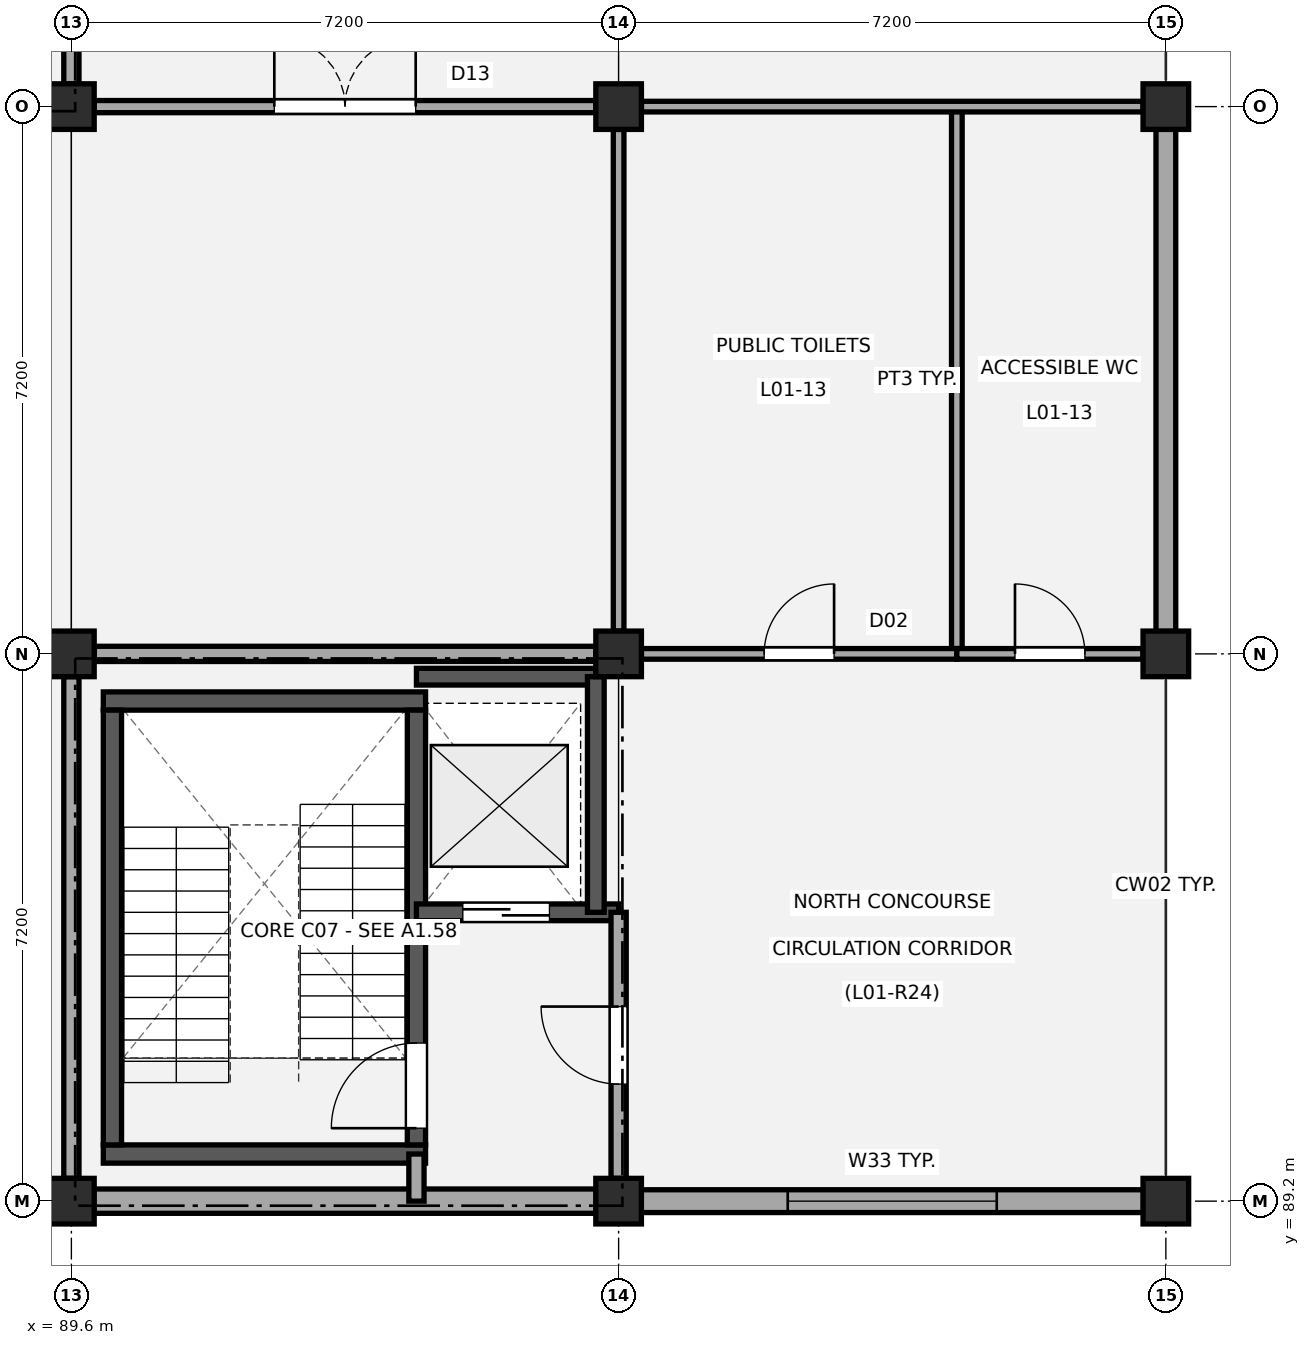
"""IFC4 building model, lengths in metres.
Left out: names, types, materials, properties, quantities, classifications, styles, units other than length and angle.
Written with IfcOpenShell. Run it as: python <this file> out.ifc"""

import sys

from ifc_helpers import new_model, si_unit, direction, frame, frame_2d, origin, origin_2d, place, context, subcontext, project, spatial, rectangle, extrude, element, fill, save


model = new_model("IFC4")
c1 = context("Model", 3, precision=1e-05, world=origin(), true_north=direction((0.0, 1.0)))
c2 = subcontext(c1, "Body", "Model", "MODEL_VIEW")
j1 = project(units=[si_unit("LENGTHUNIT", "METRE"), si_unit("PLANEANGLEUNIT", "RADIAN")], contexts=[c1])
p1 = place(None, origin())
s1 = spatial("IfcSite", under=j1, at=p1, CompositionType="ELEMENT")
p2 = place(p1, origin())
s2 = spatial("IfcBuilding", under=s1, at=p2, CompositionType="ELEMENT")
p3 = place(p2, frame((0.0, 0.0, 4.68)))
s3 = spatial("IfcBuildingStorey", under=s2, at=p3, CompositionType="ELEMENT", Elevation=4.68)
for number, where, z_axis, x_axis in (
    (1, (89.6, 89.2, 0.0), (0.0, 0.0, 1.0), (1.0, 0.0, 0.0)),
    (2, (89.6, 96.4, 0.0), (0.0, 0.0, 1.0), (1.0, 0.0, 0.0)),
    (3, (89.6, 103.6, 0.0), (0.0, 0.0, 1.0), (1.0, 0.0, 0.0)),
    (4, (96.8, 89.2, 0.0), (0.0, 0.0, 1.0), (1.0, 0.0, 0.0)),
    (5, (96.8, 96.4, 0.0), (0.0, 0.0, 1.0), (1.0, 0.0, 0.0)),
    (6, (96.8, 103.6, 0.0), (0.0, 0.0, 1.0), (1.0, 0.0, 0.0)),
    (7, (104.0, 89.2, 0.0), (0.0, 0.0, 1.0), (1.0, 0.0, 0.0)),
    (8, (104.0, 96.4, 0.0), (0.0, 0.0, 1.0), (1.0, 0.0, 0.0)),
    (9, (104.0, 103.6, 0.0), (0.0, 0.0, 1.0), (1.0, 0.0, 0.0)),
):
    element("IfcColumn", number, at=place(p3, frame(where, z_axis=z_axis, x_axis=x_axis)), inside=s3, PredefinedType="COLUMN", context=c2, shape_type="SweptSolid", body=[
        extrude(rectangle(XDim=0.6, YDim=0.6, at=origin_2d()), origin(), (0.0, 0.0, 1.0), 4.5),
    ])
p4 = place(p3, frame((96.505, 89.2, 0.0), z_axis=(0.0, 0.0, 1.0), x_axis=(-1.0, 0.0, 0.0)))
e10 = element("IfcWall", 10, at=p4, inside=s3, PredefinedType="STANDARD", context=c2, shape_type="SweptSolid", body=[
    extrude(rectangle(XDim=6.61, YDim=0.32, at=frame_2d((3.305, 0.0))), origin(), (0.0, 0.0, 1.0), 3.49),
])
p5 = place(p3, frame((103.705, 89.2, 0.0), z_axis=(0.0, 0.0, 1.0), x_axis=(-1.0, 0.0, 0.0)))
e11 = element("IfcWall", 11, at=p5, inside=s3, PredefinedType="STANDARD", context=c2, shape_type="SweptSolid", body=[
    extrude(rectangle(XDim=6.61, YDim=0.3, at=frame_2d((3.305, 0.0))), origin(), (0.0, 0.0, 1.0), 3.51),
])
p6 = place(p5, frame((1.93, 0.0, 0.95)))
e12 = element("IfcOpeningElement", 12, at=p6, cuts=e11, PredefinedType="OPENING", context=c2, shape_type="SweptSolid", body=[
    extrude(rectangle(XDim=2.75, YDim=1.4, at=frame_2d((1.375, 0.7))), frame((0.0, 0.16, 0.0), z_axis=(0.0, -1.0, 0.0), x_axis=(1.0, 0.0, 0.0)), (0.0, 0.0, 1.0), 0.32),
])
p7 = place(p3, frame((104.0, 103.305, 0.0), z_axis=(0.0, 0.0, 1.0), x_axis=(0.0, -1.0, 0.0)))
e13 = element("IfcWall", 13, at=p7, inside=s3, PredefinedType="STANDARD", context=c2, shape_type="SweptSolid", body=[
    extrude(rectangle(XDim=6.61, YDim=0.26, at=frame_2d((3.305, 0.0))), origin(), (0.0, 0.0, 1.0), 3.49),
])
p8 = place(p3, frame((89.6, 103.9, 0.0), z_axis=(0.0, 0.0, 1.0), x_axis=(0.0, 1.0, 0.0)))
e14 = element("IfcWall", 14, at=p8, inside=s3, PredefinedType="PARTITIONING", context=c2, shape_type="SweptSolid", body=[
    extrude(rectangle(XDim=3.5, YDim=0.2, at=frame_2d((1.75, 0.0))), origin(), (0.0, 0.0, 1.0), 3.54),
])
for number, where, z_axis, x_axis in (
    (15, (90.02, 89.82, 0.0), (0.0, 0.0, 1.0), (1.0, 0.0, 0.0)),
    (16, (90.02, 95.78, 0.0), (0.0, 0.0, 1.0), (1.0, 0.0, 0.0)),
):
    element("IfcWall", number, at=place(p3, frame(where, z_axis=z_axis, x_axis=x_axis)), inside=s3, PredefinedType="SHEAR", context=c2, shape_type="SweptSolid", body=[
        extrude(rectangle(XDim=4.24, YDim=0.24, at=frame_2d((2.12, 0.0))), origin(), (0.0, 0.0, 1.0), 4.2),
    ])
p9 = place(p3, frame((90.14, 89.94, 0.0), z_axis=(0.0, 0.0, 1.0), x_axis=(0.0, 1.0, 0.0)))
e17 = element("IfcWall", 17, at=p9, inside=s3, PredefinedType="SHEAR", context=c2, shape_type="SweptSolid", body=[
    extrude(rectangle(XDim=5.72, YDim=0.24, at=frame_2d((2.86, 0.0))), origin(), (0.0, 0.0, 1.0), 4.2),
])
p10 = place(p3, frame((94.14, 89.94, 0.0), z_axis=(0.0, 0.0, 1.0), x_axis=(0.0, 1.0, 0.0)))
e18 = element("IfcWall", 18, at=p10, inside=s3, PredefinedType="SHEAR", context=c2, shape_type="SweptSolid", body=[
    extrude(rectangle(XDim=5.72, YDim=0.24, at=frame_2d((2.86, 0.0))), origin(), (0.0, 0.0, 1.0), 4.2),
])
p11 = place(p10, frame((0.22, 0.0, 0.0)))
e19 = element("IfcOpeningElement", 19, at=p11, cuts=e18, PredefinedType="OPENING", context=c2, shape_type="SweptSolid", body=[
    extrude(rectangle(XDim=1.12, YDim=2.15, at=frame_2d((0.56, 1.075))), frame((0.0, 0.13, 0.0), z_axis=(0.0, -1.0, 0.0), x_axis=(1.0, 0.0, 0.0)), (0.0, 0.0, 1.0), 0.26),
])
p12 = place(p3, frame((94.14, 93.0, 0.0), z_axis=(0.0, 0.0, 1.0), x_axis=(1.0, 0.0, 0.0)))
e20 = element("IfcWall", 20, at=p12, inside=s3, PredefinedType="SHEAR", context=c2, shape_type="SweptSolid", body=[
    extrude(rectangle(XDim=2.66, YDim=0.22, at=frame_2d((1.33, 0.0))), origin(), (0.0, 0.0, 1.0), 4.2),
])
p13 = place(p12, frame((0.61, 0.0, 0.0)))
e21 = element("IfcOpeningElement", 21, at=p13, cuts=e20, PredefinedType="OPENING", context=c2, shape_type="SweptSolid", body=[
    extrude(rectangle(XDim=1.14, YDim=2.15, at=frame_2d((0.57, 1.075))), frame((0.0, 0.12, 0.0), z_axis=(0.0, -1.0, 0.0), x_axis=(1.0, 0.0, 0.0)), (0.0, 0.0, 1.0), 0.24),
])
p14 = place(p3, frame((94.14, 96.1, 0.0), z_axis=(0.0, 0.0, 1.0), x_axis=(1.0, 0.0, 0.0)))
e22 = element("IfcWall", 22, at=p14, inside=s3, PredefinedType="SHEAR", context=c2, shape_type="SweptSolid", body=[
    extrude(rectangle(XDim=2.36, YDim=0.22, at=frame_2d((1.18, 0.0))), origin(), (0.0, 0.0, 1.0), 4.2),
])
p15 = place(p3, frame((96.5, 93.0, 0.0), z_axis=(0.0, 0.0, 1.0), x_axis=(0.0, 1.0, 0.0)))
e23 = element("IfcWall", 23, at=p15, inside=s3, PredefinedType="SHEAR", context=c2, shape_type="SweptSolid", body=[
    extrude(rectangle(XDim=3.1, YDim=0.22, at=frame_2d((1.55, 0.0))), origin(), (0.0, 0.0, 1.0), 4.2),
])
p16 = place(p3, frame((94.14, 89.2, 0.0), z_axis=(0.0, 0.0, 1.0), x_axis=(0.0, 1.0, 0.0)))
e24 = element("IfcWall", 24, at=p16, inside=s3, PredefinedType="PARTITIONING", context=c2, shape_type="SweptSolid", body=[
    extrude(rectangle(XDim=0.62, YDim=0.2, at=frame_2d((0.31, 0.0))), origin(), (0.0, 0.0, 1.0), 3.49),
])
p17 = place(p3, frame((89.6, 89.5, 0.0), z_axis=(0.0, 0.0, 1.0), x_axis=(0.0, 1.0, 0.0)))
e25 = element("IfcWall", 25, at=p17, inside=s3, PredefinedType="PARTITIONING", context=c2, shape_type="SweptSolid", body=[
    extrude(rectangle(XDim=6.6, YDim=0.2, at=frame_2d((3.3, 0.0))), origin(), (0.0, 0.0, 1.0), 3.54),
])
p18 = place(p3, frame((96.8, 89.5, 0.0), z_axis=(0.0, 0.0, 1.0), x_axis=(0.0, 1.0, 0.0)))
e26 = element("IfcWall", 26, at=p18, inside=s3, PredefinedType="PARTITIONING", context=c2, shape_type="SweptSolid", body=[
    extrude(rectangle(XDim=3.5, YDim=0.2, at=frame_2d((1.75, 0.0))), origin(), (0.0, 0.0, 1.0), 3.54),
])
p19 = place(p18, frame((1.24, 0.0, 0.0)))
e27 = element("IfcOpeningElement", 27, at=p19, cuts=e26, PredefinedType="OPENING", context=c2, shape_type="SweptSolid", body=[
    extrude(rectangle(XDim=1.02, YDim=2.15, at=frame_2d((0.51, 1.075))), frame((0.0, 0.11, 0.0), z_axis=(0.0, -1.0, 0.0), x_axis=(1.0, 0.0, 0.0)), (0.0, 0.0, 1.0), 0.22),
])
p20 = place(p3, frame((89.9, 96.4, 0.0), z_axis=(0.0, 0.0, 1.0), x_axis=(1.0, 0.0, 0.0)))
e28 = element("IfcWall", 28, at=p20, inside=s3, PredefinedType="PARTITIONING", context=c2, shape_type="SweptSolid", body=[
    extrude(rectangle(XDim=6.6, YDim=0.2, at=frame_2d((3.3, 0.0))), origin(), (0.0, 0.0, 1.0), 3.59),
])
p21 = place(p3, frame((101.25, 96.4, 0.0), z_axis=(0.0, 0.0, 1.0), x_axis=(0.0, 1.0, 0.0)))
e29 = element("IfcWall", 29, at=p21, inside=s3, PredefinedType="PARTITIONING", context=c2, shape_type="SweptSolid", body=[
    extrude(rectangle(XDim=7.2, YDim=0.14, at=frame_2d((3.6, 0.0))), origin(), (0.0, 0.0, 1.0), 3.62),
])
p22 = place(p3, frame((97.1, 96.4, 0.0), z_axis=(0.0, 0.0, 1.0), x_axis=(1.0, 0.0, 0.0)))
e30 = element("IfcWall", 30, at=p22, inside=s3, PredefinedType="PARTITIONING", context=c2, shape_type="SweptSolid", body=[
    extrude(rectangle(XDim=4.15, YDim=0.14, at=frame_2d((2.075, 0.0))), origin(), (0.0, 0.0, 1.0), 3.54),
])
p23 = place(p22, frame((1.615, 0.0, 0.0)))
e31 = element("IfcOpeningElement", 31, at=p23, cuts=e30, PredefinedType="OPENING", context=c2, shape_type="SweptSolid", body=[
    extrude(rectangle(XDim=0.92, YDim=2.08, at=frame_2d((0.46, 1.04))), frame((0.0, 0.08, 0.0), z_axis=(0.0, -1.0, 0.0), x_axis=(1.0, 0.0, 0.0)), (0.0, 0.0, 1.0), 0.16),
])
p24 = place(p3, frame((101.25, 96.4, 0.0), z_axis=(0.0, 0.0, 1.0), x_axis=(1.0, 0.0, 0.0)))
e32 = element("IfcWall", 32, at=p24, inside=s3, PredefinedType="PARTITIONING", context=c2, shape_type="SweptSolid", body=[
    extrude(rectangle(XDim=2.45, YDim=0.14, at=frame_2d((1.225, 0.0))), origin(), (0.0, 0.0, 1.0), 3.54),
])
p25 = place(p24, frame((0.765, 0.0, 0.0)))
e33 = element("IfcOpeningElement", 33, at=p25, cuts=e32, PredefinedType="OPENING", context=c2, shape_type="SweptSolid", body=[
    extrude(rectangle(XDim=0.92, YDim=2.08, at=frame_2d((0.46, 1.04))), frame((0.0, 0.08, 0.0), z_axis=(0.0, -1.0, 0.0), x_axis=(1.0, 0.0, 0.0)), (0.0, 0.0, 1.0), 0.16),
])
p26 = place(p3, frame((97.1, 103.6, 0.0), z_axis=(0.0, 0.0, 1.0), x_axis=(1.0, 0.0, 0.0)))
e34 = element("IfcWall", 34, at=p26, inside=s3, PredefinedType="PARTITIONING", context=c2, shape_type="SweptSolid", body=[
    extrude(rectangle(XDim=6.6, YDim=0.14, at=frame_2d((3.3, 0.0))), origin(), (0.0, 0.0, 1.0), 3.59),
])
p27 = place(p3, frame((96.8, 96.7, 0.0), z_axis=(0.0, 0.0, 1.0), x_axis=(0.0, 1.0, 0.0)))
e35 = element("IfcWall", 35, at=p27, inside=s3, PredefinedType="PARTITIONING", context=c2, shape_type="SweptSolid", body=[
    extrude(rectangle(XDim=6.6, YDim=0.14, at=frame_2d((3.3, 0.0))), origin(), (0.0, 0.0, 1.0), 3.59),
])
p28 = place(p3, frame((89.9, 103.6, 0.0), z_axis=(0.0, 0.0, 1.0), x_axis=(1.0, 0.0, 0.0)))
e36 = element("IfcWall", 36, at=p28, inside=s3, PredefinedType="PARTITIONING", context=c2, shape_type="SweptSolid", body=[
    extrude(rectangle(XDim=6.6, YDim=0.16, at=frame_2d((3.3, 0.0))), origin(), (0.0, 0.0, 1.0), 3.54),
])
p29 = place(p28, frame((2.37, 0.0, 0.0)))
e37 = element("IfcOpeningElement", 37, at=p29, cuts=e36, PredefinedType="OPENING", context=c2, shape_type="SweptSolid", body=[
    extrude(rectangle(XDim=1.86, YDim=2.26, at=frame_2d((0.93, 1.13))), frame((0.0, 0.09, 0.0), z_axis=(0.0, -1.0, 0.0), x_axis=(1.0, 0.0, 0.0)), (0.0, 0.0, 1.0), 0.18),
])
p30 = place(p6, origin())
e38 = element("IfcWindow", 38, at=p30, inside=s3, PartitioningType="SINGLE_PANEL", PredefinedType="WINDOW", context=c2, shape_type="SweptSolid", body=[
    extrude(rectangle(XDim=2.75, YDim=1.4, at=frame_2d((1.375, 0.7))), frame((0.0, 0.03, 0.0), z_axis=(0.0, -1.0, 0.0), x_axis=(1.0, 0.0, 0.0)), (0.0, 0.0, 1.0), 0.06),
])
fill(e12, e38)
p31 = place(p11, origin())
e39 = element("IfcDoor", 39, at=p31, inside=s3, OperationType="SINGLE_SWING_LEFT", PredefinedType="DOOR", context=c2, shape_type="SweptSolid", body=[
    extrude(rectangle(XDim=1.12, YDim=2.15, at=frame_2d((0.56, 1.075))), frame((0.0, 0.025, 0.0), z_axis=(0.0, -1.0, 0.0), x_axis=(1.0, 0.0, 0.0)), (0.0, 0.0, 1.0), 0.05),
])
fill(e19, e39)
p32 = place(p13, origin())
e40 = element("IfcDoor", 40, at=p32, inside=s3, OperationType="SLIDING_TO_LEFT", PredefinedType="DOOR", context=c2, shape_type="SweptSolid", body=[
    extrude(rectangle(XDim=1.14, YDim=2.15, at=frame_2d((0.57, 1.075))), frame((0.0, 0.025, 0.0), z_axis=(0.0, -1.0, 0.0), x_axis=(1.0, 0.0, 0.0)), (0.0, 0.0, 1.0), 0.05),
])
fill(e21, e40)
p33 = place(p19, origin())
e41 = element("IfcDoor", 41, at=p33, inside=s3, OperationType="SINGLE_SWING_RIGHT", PredefinedType="DOOR", context=c2, shape_type="SweptSolid", body=[
    extrude(rectangle(XDim=1.02, YDim=2.15, at=frame_2d((0.51, 1.075))), frame((0.0, 0.025, 0.0), z_axis=(0.0, -1.0, 0.0), x_axis=(1.0, 0.0, 0.0)), (0.0, 0.0, 1.0), 0.05),
])
fill(e27, e41)
p34 = place(p23, origin())
e42 = element("IfcDoor", 42, at=p34, inside=s3, OperationType="SINGLE_SWING_RIGHT", PredefinedType="DOOR", context=c2, shape_type="SweptSolid", body=[
    extrude(rectangle(XDim=0.92, YDim=2.08, at=frame_2d((0.46, 1.04))), frame((0.0, 0.025, 0.0), z_axis=(0.0, -1.0, 0.0), x_axis=(1.0, 0.0, 0.0)), (0.0, 0.0, 1.0), 0.05),
])
fill(e31, e42)
p35 = place(p25, origin())
e43 = element("IfcDoor", 43, at=p35, inside=s3, OperationType="SINGLE_SWING_LEFT", PredefinedType="DOOR", context=c2, shape_type="SweptSolid", body=[
    extrude(rectangle(XDim=0.92, YDim=2.08, at=frame_2d((0.46, 1.04))), frame((0.0, 0.025, 0.0), z_axis=(0.0, -1.0, 0.0), x_axis=(1.0, 0.0, 0.0)), (0.0, 0.0, 1.0), 0.05),
])
fill(e33, e43)
p36 = place(p29, origin())
e44 = element("IfcDoor", 44, at=p36, inside=s3, OperationType="DOUBLE_DOOR_SINGLE_SWING", PredefinedType="DOOR", context=c2, shape_type="SweptSolid", body=[
    extrude(rectangle(XDim=1.86, YDim=2.26, at=frame_2d((0.93, 1.13))), frame((0.0, 0.025, 0.0), z_axis=(0.0, -1.0, 0.0), x_axis=(1.0, 0.0, 0.0)), (0.0, 0.0, 1.0), 0.05),
])
fill(e37, e44)
save(model, sys.argv[1])
